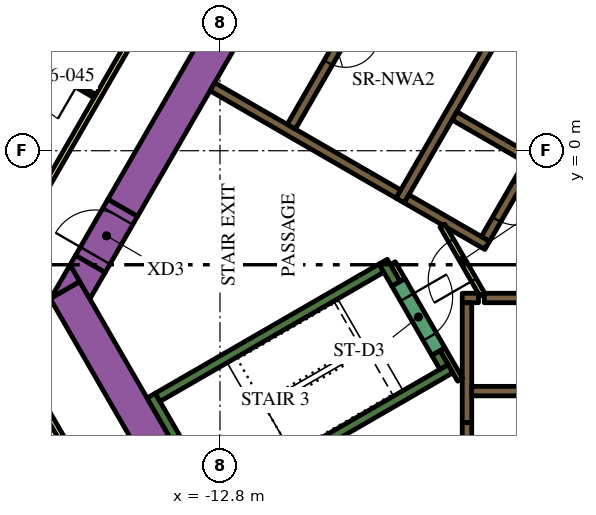
"""IFC4 building model, lengths in metres.
Left out: names, types, materials, properties, quantities, classifications, styles, units other than length and angle.
Written with IfcOpenShell. Run it as: python <this file> out.ifc"""

import sys

from ifc_helpers import new_model, si_unit, direction, frame, frame_2d, origin, place, context, subcontext, project, spatial, polyline, rectangle, outline, extrude, element, fill, save


model = new_model("IFC4")
c1 = context("Model", 3, precision=1e-05, world=origin(), true_north=direction((0.0, 1.0)))
c2 = subcontext(c1, "Body", "Model", "MODEL_VIEW")
j1 = project(units=[si_unit("LENGTHUNIT", "METRE"), si_unit("PLANEANGLEUNIT", "RADIAN")], contexts=[c1])
p1 = place(None, origin())
s1 = spatial("IfcSite", under=j1, at=p1, CompositionType="ELEMENT")
p2 = place(p1, origin())
s2 = spatial("IfcBuilding", under=s1, at=p2, CompositionType="ELEMENT")
p3 = place(p2, frame((0.0, 0.0, 87.6)))
s3 = spatial("IfcBuildingStorey", under=s2, at=p3, CompositionType="ELEMENT", Elevation=87.6)
p4 = place(p3, frame((-15.36, -1.503, 0.0), z_axis=(0.0, 0.0, 1.0), x_axis=(0.50000389221, 0.866023156604, 0.0)))
e1 = element("IfcWall", 1, at=p4, inside=s3, PredefinedType="SOLIDWALL", context=c2, shape_type="SweptSolid", body=[
    extrude(rectangle(XDim=21.0, YDim=0.9, at=frame_2d((10.5, 0.0))), origin(), (0.0, 0.0, 1.0), 3.9),
])
p5 = place(p3, frame((-12.134, -11.883, 0.0), z_axis=(0.0, 0.0, 1.0), x_axis=(-0.500005339912, 0.866022320763, 0.0)))
e2 = element("IfcWall", 2, at=p5, inside=s3, PredefinedType="SOLIDWALL", context=c2, shape_type="SweptSolid", body=[
    extrude(rectangle(XDim=9.488, YDim=0.9, at=frame_2d((4.744, 0.0))), origin(), (0.0, 0.0, 1.0), 3.9),
])
p6 = place(p3, origin())
e3 = element("IfcWall", 3, at=p6, inside=s3, PredefinedType="SOLIDWALL", context=c2, shape_type="SweptSolid", body=[
    extrude(outline(polyline([(-16.489, -3.44), (-17.251, -3.88), (-16.743, -3.0), (-16.489, -3.44)])), origin(), (0.0, 0.0, 1.0), 3.9),
])
e4 = element("IfcWall", 4, at=p6, inside=s3, PredefinedType="SOLIDWALL", context=c2, shape_type="SweptSolid", body=[
    extrude(outline(polyline([(-15.82, -3.201), (-16.223, -3.9), (-16.743, -3.0), (-16.599, -2.751), (-15.82, -3.201)])), origin(), (0.0, 0.0, 1.0), 3.9),
])
p7 = place(p3, frame((-12.885, -9.431, 0.0), z_axis=(0.0, 0.0, 1.0), x_axis=(-0.500020560727, 0.866013532718, 0.0)))
e5 = element("IfcWall", 5, at=p7, inside=s3, PredefinedType="SOLIDWALL", context=c2, shape_type="SweptSolid", body=[
    extrude(rectangle(XDim=3.45, YDim=0.25, at=frame_2d((1.725, 0.0))), origin(), (0.0, 0.0, 1.0), 3.9),
])
p8 = place(p3, frame((-14.44, -6.49, 0.0), z_axis=(0.0, 0.0, 1.0), x_axis=(0.866022966069, 0.500004222222, 0.0)))
e6 = element("IfcWall", 6, at=p8, inside=s3, PredefinedType="SOLIDWALL", context=c2, shape_type="SweptSolid", body=[
    extrude(rectangle(XDim=6.8, YDim=0.25, at=frame_2d((3.4, 0.0))), origin(), (0.0, 0.0, 1.0), 3.9),
])
p9 = place(p3, frame((-8.168, -3.503, 0.0), z_axis=(0.0, 0.0, 1.0), x_axis=(-0.499952099219, 0.866053057547, 0.0)))
e7 = element("IfcWall", 7, at=p9, inside=s3, PredefinedType="SOLIDWALL", context=c2, shape_type="SweptSolid", body=[
    extrude(rectangle(XDim=0.675, YDim=0.25, at=frame_2d((0.337, 0.0))), origin(), (0.0, 0.0, 1.0), 3.9),
])
p10 = place(p3, frame((-12.84, -9.261, 0.0), z_axis=(0.0, 0.0, 1.0), x_axis=(0.866016039709, 0.500016218704, 0.0)))
e8 = element("IfcWall", 8, at=p10, inside=s3, PredefinedType="SOLIDWALL", context=c2, shape_type="SweptSolid", body=[
    extrude(rectangle(XDim=7.05, YDim=0.25, at=frame_2d((3.525, 0.0))), origin(), (0.0, 0.0, 1.0), 3.9),
])
p11 = place(p3, frame((-6.905, -5.69, 0.0), z_axis=(0.0, 0.0, 1.0), x_axis=(-0.500402024738, 0.865793170242, 0.0)))
e9 = element("IfcWall", 9, at=p11, inside=s3, PredefinedType="SOLIDWALL", context=c2, shape_type="SweptSolid", body=[
    extrude(rectangle(XDim=0.425, YDim=0.25, at=frame_2d((0.212, 0.0))), origin(), (0.0, 0.0, 1.0), 3.9),
])
p12 = place(p3, frame((-5.845, -3.875, 0.0), z_axis=(0.0, 0.0, 1.0), x_axis=(1.0, 0.0, 0.0)))
e10 = element("IfcWall", 10, at=p12, inside=s3, PredefinedType="SOLIDWALL", context=c2, shape_type="SweptSolid", body=[
    extrude(rectangle(XDim=12.27, YDim=0.25, at=frame_2d((6.135, 0.0))), origin(), (0.0, 0.0, 1.0), 3.9),
])
p13 = place(p3, frame((-6.425, -3.875, 0.0), z_axis=(0.0, 0.0, 1.0), x_axis=(1.0, 0.0, 0.0)))
e11 = element("IfcWall", 11, at=p13, inside=s3, PredefinedType="SOLIDWALL", context=c2, shape_type="SweptSolid", body=[
    extrude(rectangle(XDim=0.428, YDim=0.25, at=frame_2d((0.214, 0.0))), origin(), (0.0, 0.0, 1.0), 3.9),
])
p14 = place(p3, frame((-6.3, -4.0, 0.0), z_axis=(0.0, 0.0, 1.0), x_axis=(0.0, -1.0, 0.0)))
e12 = element("IfcWall", 12, at=p14, inside=s3, PredefinedType="SOLIDWALL", context=c2, shape_type="SweptSolid", body=[
    extrude(rectangle(XDim=3.154, YDim=0.25, at=frame_2d((1.577, 0.0))), origin(), (0.0, 0.0, 1.0), 3.9),
])
p15 = place(p3, frame((-8.06, -1.311, 0.0), z_axis=(0.0, 0.0, 1.0), x_axis=(0.50000273126, 0.866023826885, 0.0)))
e13 = element("IfcWall", 13, at=p15, inside=s3, PredefinedType="SOLIDWALL", context=c2, shape_type="SweptSolid", body=[
    extrude(rectangle(XDim=10.33, YDim=0.25, at=frame_2d((5.165, 0.0))), origin(), (0.0, 0.0, 1.0), 3.9),
])
for number, where, z_axis, x_axis in (
    (14, (-5.369, 3.1, 0.0), (0.0, 0.0, 1.0), (0.866, -0.5, 0.0)),
    (15, (-4.724, -0.182, 0.0), (0.0, 0.0, 1.0), (-0.866, 0.5, 0.0)),
):
    element("IfcWall", number, at=place(p3, frame(where, z_axis=z_axis, x_axis=x_axis)), inside=s3, PredefinedType="SOLIDWALL", context=c2, shape_type="SweptSolid", body=[
        extrude(rectangle(XDim=2.2, YDim=0.25, at=frame_2d((1.1, 0.0))), origin(), (0.0, 0.0, 1.0), 3.9),
    ])
e16 = element("IfcWall", 16, at=p6, inside=s3, PredefinedType="SOLIDWALL", context=c2, shape_type="SweptSolid", body=[
    extrude(outline(polyline([(-5.922, -2.257), (-5.922, -2.257), (-5.705, -2.382), (-5.83, -2.598), (-6.829, -2.021), (-6.88, -1.934), (-6.88, -1.934), (-6.93, -1.963), (-7.952, -1.373), (-7.827, -1.156), (-5.922, -2.257)])), origin(), (0.0, 0.0, 1.0), 3.9),
])
p16 = place(p3, frame((-8.106, -1.14, 0.0), z_axis=(0.0, 0.0, 1.0), x_axis=(-0.866000643155, 0.500042884217, 0.0)))
e17 = element("IfcWall", 17, at=p16, inside=s3, PredefinedType="SOLIDWALL", context=c2, shape_type="SweptSolid", body=[
    extrude(rectangle(XDim=5.65, YDim=0.25, at=frame_2d((2.825, 0.0))), origin(), (0.0, 0.0, 1.0), 3.9),
])
p17 = place(p3, frame((-6.48, -6.027, 0.0), z_axis=(0.0, 0.0, 1.0), x_axis=(-0.499927229454, 0.866067413802, 0.0)))
e18 = element("IfcWall", 18, at=p17, inside=s3, PredefinedType="PARTITIONING", context=c2, shape_type="SweptSolid", body=[
    extrude(rectangle(XDim=0.929, YDim=0.15, at=frame_2d((0.464, 0.0))), origin(), (0.0, 0.0, 1.0), 3.9),
])
p18 = place(p3, frame((-8.252, -2.958, 0.0), z_axis=(0.0, 0.0, 1.0), x_axis=(0.500174715838, -0.865924508047, 0.0)))
e19 = element("IfcWall", 19, at=p18, inside=s3, PredefinedType="PARTITIONING", context=c2, shape_type="SweptSolid", body=[
    extrude(rectangle(XDim=0.514, YDim=0.15, at=frame_2d((0.257, 0.0))), origin(), (0.0, 0.0, 1.0), 2.75),
])
p19 = place(p3, frame((-6.175, -6.325, 0.0), z_axis=(0.0, 0.0, 1.0), x_axis=(1.0, 0.0, 0.0)))
e20 = element("IfcWall", 20, at=p19, inside=s3, PredefinedType="SOLIDWALL", context=c2, shape_type="SweptSolid", body=[
    extrude(rectangle(XDim=12.35, YDim=0.25, at=frame_2d((6.175, 0.0))), origin(), (0.0, 0.0, 1.0), 3.9),
])
p20 = place(p19, frame((3.205, 0.0, 0.0)))
e21 = element("IfcOpeningElement", 21, at=p20, cuts=e20, PredefinedType="OPENING", context=c2, shape_type="SweptSolid", body=[
    extrude(rectangle(XDim=0.9, YDim=2.1, at=frame_2d((0.45, 1.05))), frame((0.0, 0.135, 0.0), z_axis=(0.0, -1.0, 0.0), x_axis=(1.0, 0.0, 0.0)), (0.0, 0.0, 1.0), 0.27),
])
p21 = place(p19, frame((8.145, 0.0, 0.0)))
e22 = element("IfcOpeningElement", 22, at=p21, cuts=e20, PredefinedType="OPENING", context=c2, shape_type="SweptSolid", body=[
    extrude(rectangle(XDim=1.1, YDim=2.1, at=frame_2d((0.55, 1.05))), frame((0.0, 0.135, 0.0), z_axis=(0.0, -1.0, 0.0), x_axis=(1.0, 0.0, 0.0)), (0.0, 0.0, 1.0), 0.27),
])
p22 = place(p19, frame((10.665, 0.0, 0.0)))
e23 = element("IfcOpeningElement", 23, at=p22, cuts=e20, PredefinedType="OPENING", context=c2, shape_type="SweptSolid", body=[
    extrude(rectangle(XDim=1.1, YDim=2.1, at=frame_2d((0.55, 1.05))), frame((0.0, 0.135, 0.0), z_axis=(0.0, -1.0, 0.0), x_axis=(1.0, 0.0, 0.0)), (0.0, 0.0, 1.0), 0.27),
])
p23 = place(p3, frame((-6.008, 9.144, 0.0), z_axis=(0.0, 0.0, 1.0), x_axis=(-0.500006956611, -0.866021387346, 0.0)))
e24 = element("IfcWall", 24, at=p23, inside=s3, PredefinedType="SOLIDWALL", context=c2, shape_type="SweptSolid", body=[
    extrude(rectangle(XDim=9.83, YDim=0.25, at=frame_2d((4.915, 0.0))), origin(), (0.0, 0.0, 1.0), 3.9),
])
p24 = place(p23, frame((6.985, 0.0, 0.0)))
e25 = element("IfcOpeningElement", 25, at=p24, cuts=e24, PredefinedType="OPENING", context=c2, shape_type="SweptSolid", body=[
    extrude(rectangle(XDim=0.9, YDim=2.1, at=frame_2d((0.45, 1.05))), frame((0.0, 0.135, 0.0), z_axis=(0.0, -1.0, 0.0), x_axis=(1.0, 0.0, 0.0)), (0.0, 0.0, 1.0), 0.27),
])
p25 = place(p3, frame((-0.898, 6.194, 0.0), z_axis=(0.0, 0.0, 1.0), x_axis=(-0.499996202215, -0.866027596426, 0.0)))
e26 = element("IfcWall", 26, at=p25, inside=s3, PredefinedType="SOLIDWALL", context=c2, shape_type="SweptSolid", body=[
    extrude(rectangle(XDim=9.83, YDim=0.25, at=frame_2d((4.915, 0.0))), origin(), (0.0, 0.0, 1.0), 3.9),
])
p26 = place(p25, frame((0.585, 0.0, 0.0)))
e27 = element("IfcOpeningElement", 27, at=p26, cuts=e26, PredefinedType="OPENING", context=c2, shape_type="SweptSolid", body=[
    extrude(rectangle(XDim=1.1, YDim=2.1, at=frame_2d((0.55, 1.05))), frame((0.0, 0.135, 0.0), z_axis=(0.0, -1.0, 0.0), x_axis=(1.0, 0.0, 0.0)), (0.0, 0.0, 1.0), 0.27),
])
p27 = place(p25, frame((3.105, 0.0, 0.0)))
e28 = element("IfcOpeningElement", 28, at=p27, cuts=e26, PredefinedType="OPENING", context=c2, shape_type="SweptSolid", body=[
    extrude(rectangle(XDim=1.1, YDim=2.1, at=frame_2d((0.55, 1.05))), frame((0.0, 0.135, 0.0), z_axis=(0.0, -1.0, 0.0), x_axis=(1.0, 0.0, 0.0)), (0.0, 0.0, 1.0), 0.27),
])
p28 = place(p25, frame((5.625, 0.0, 0.0)))
e29 = element("IfcOpeningElement", 29, at=p28, cuts=e26, PredefinedType="OPENING", context=c2, shape_type="SweptSolid", body=[
    extrude(rectangle(XDim=1.1, YDim=2.1, at=frame_2d((0.55, 1.05))), frame((0.0, 0.135, 0.0), z_axis=(0.0, -1.0, 0.0), x_axis=(1.0, 0.0, 0.0)), (0.0, 0.0, 1.0), 0.27),
])
p29 = place(p25, frame((8.145, 0.0, 0.0)))
e30 = element("IfcOpeningElement", 30, at=p29, cuts=e26, PredefinedType="OPENING", context=c2, shape_type="SweptSolid", body=[
    extrude(rectangle(XDim=1.1, YDim=2.1, at=frame_2d((0.55, 1.05))), frame((0.0, 0.135, 0.0), z_axis=(0.0, -1.0, 0.0), x_axis=(1.0, 0.0, 0.0)), (0.0, 0.0, 1.0), 0.27),
])
p30 = place(p3, frame((-8.103, -3.466, 0.0), z_axis=(0.0, 0.0, 1.0), x_axis=(0.500078061341, -0.865980330357, 0.0)))
e31 = element("IfcWall", 31, at=p30, inside=s3, PredefinedType="SOLIDWALL", context=c2, shape_type="SweptSolid", body=[
    extrude(rectangle(XDim=2.1, YDim=0.4, at=frame_2d((1.05, 0.0))), origin(), (0.0, 0.0, 1.0), 3.9),
])
p31 = place(p30, frame((0.45, 0.0, 0.0)))
e32 = element("IfcOpeningElement", 32, at=p31, cuts=e31, PredefinedType="OPENING", context=c2, shape_type="SweptSolid", body=[
    extrude(rectangle(XDim=1.2, YDim=2.1, at=frame_2d((0.6, 1.05))), frame((0.0, 0.21, 0.0), z_axis=(0.0, -1.0, 0.0), x_axis=(1.0, 0.0, 0.0)), (0.0, 0.0, 1.0), 0.42),
])
p32 = place(p3, frame((-6.3, -7.154, 0.0), z_axis=(0.0, 0.0, 1.0), x_axis=(0.0, -1.0, 0.0)))
e33 = element("IfcWall", 33, at=p32, inside=s3, PredefinedType="SOLIDWALL", context=c2, shape_type="SweptSolid", body=[
    extrude(rectangle(XDim=1.8, YDim=0.25, at=frame_2d((0.9, 0.0))), origin(), (0.0, 0.0, 1.0), 3.9),
])
p33 = place(p32, frame((0.45, 0.0, 0.0)))
e34 = element("IfcOpeningElement", 34, at=p33, cuts=e33, PredefinedType="OPENING", context=c2, shape_type="SweptSolid", body=[
    extrude(rectangle(XDim=0.9, YDim=2.1, at=frame_2d((0.45, 1.05))), frame((0.0, 0.135, 0.0), z_axis=(0.0, -1.0, 0.0), x_axis=(1.0, 0.0, 0.0)), (0.0, 0.0, 1.0), 0.27),
])
p34 = place(p3, frame((-5.895, -3.79, 0.0), z_axis=(0.0, 0.0, 1.0), x_axis=(-0.49994051562, 0.866059744384, 0.0)))
e35 = element("IfcWall", 35, at=p34, inside=s3, PredefinedType="PARTITIONING", context=c2, shape_type="SweptSolid", body=[
    extrude(rectangle(XDim=2.1, YDim=0.15, at=frame_2d((1.05, 0.0))), origin(), (0.0, 0.0, 1.0), 2.75),
])
p35 = place(p34, frame((0.45, 0.0, 0.0)))
e36 = element("IfcOpeningElement", 36, at=p35, cuts=e35, PredefinedType="OPENING", context=c2, shape_type="SweptSolid", body=[
    extrude(rectangle(XDim=1.2, YDim=2.1, at=frame_2d((0.6, 1.05))), frame((0.0, 0.085, 0.0), z_axis=(0.0, -1.0, 0.0), x_axis=(1.0, 0.0, 0.0)), (0.0, 0.0, 1.0), 0.17),
])
p36 = place(p3, frame((-16.209, -2.976, 0.0), z_axis=(0.0, 0.0, 1.0), x_axis=(0.499954529098, 0.86605165483, 0.0)))
e37 = element("IfcWall", 37, at=p36, inside=s3, PredefinedType="SOLIDWALL", context=c2, shape_type="SweptSolid", body=[
    extrude(rectangle(XDim=1.7, YDim=0.9, at=frame_2d((0.85, 0.0))), origin(), (0.0, 0.0, 1.0), 3.9),
])
p37 = place(p36, frame((0.25, 0.0, 0.0)))
e38 = element("IfcOpeningElement", 38, at=p37, cuts=e37, PredefinedType="OPENING", context=c2, shape_type="SweptSolid", body=[
    extrude(rectangle(XDim=1.2, YDim=2.1, at=frame_2d((0.6, 1.05))), frame((0.0, 0.46, 0.0), z_axis=(0.0, -1.0, 0.0), x_axis=(1.0, 0.0, 0.0)), (0.0, 0.0, 1.0), 0.92),
])
p38 = place(p3, frame((-19.081, -3.9, 0.0), z_axis=(0.0, 0.0, 1.0), x_axis=(0.499998313975, 0.866026377209, 0.0)))
e39 = element("IfcWall", 39, at=p38, inside=s3, PredefinedType="PARTITIONING", context=c2, shape_type="SweptSolid", body=[
    extrude(rectangle(XDim=25.766, YDim=0.15, at=frame_2d((12.883, 0.0))), origin(), (0.0, 0.0, 1.0), 2.75),
])
p39 = place(p38, frame((19.306, 0.0, 0.0)))
e40 = element("IfcOpeningElement", 40, at=p39, cuts=e39, PredefinedType="OPENING", context=c2, shape_type="SweptSolid", body=[
    extrude(rectangle(XDim=1.0, YDim=2.1, at=frame_2d((0.5, 1.05))), frame((0.0, 0.085, 0.0), z_axis=(0.0, -1.0, 0.0), x_axis=(1.0, 0.0, 0.0)), (0.0, 0.0, 1.0), 0.17),
])
p40 = place(p38, frame((18.0, 0.0, 0.0)))
e41 = element("IfcOpeningElement", 41, at=p40, cuts=e39, PredefinedType="OPENING", context=c2, shape_type="SweptSolid", body=[
    extrude(rectangle(XDim=1.0, YDim=2.1, at=frame_2d((0.5, 1.05))), frame((0.0, 0.085, 0.0), z_axis=(0.0, -1.0, 0.0), x_axis=(1.0, 0.0, 0.0)), (0.0, 0.0, 1.0), 0.17),
])
p41 = place(p38, frame((10.874, 0.0, 0.0)))
e42 = element("IfcOpeningElement", 42, at=p41, cuts=e39, PredefinedType="OPENING", context=c2, shape_type="SweptSolid", body=[
    extrude(rectangle(XDim=0.9, YDim=2.1, at=frame_2d((0.45, 1.05))), frame((0.0, 0.085, 0.0), z_axis=(0.0, -1.0, 0.0), x_axis=(1.0, 0.0, 0.0)), (0.0, 0.0, 1.0), 0.17),
])
p42 = place(p38, frame((8.548, 0.0, 0.0)))
e43 = element("IfcOpeningElement", 43, at=p42, cuts=e39, PredefinedType="OPENING", context=c2, shape_type="SweptSolid", body=[
    extrude(rectangle(XDim=1.1, YDim=2.1, at=frame_2d((0.55, 1.05))), frame((0.0, 0.085, 0.0), z_axis=(0.0, -1.0, 0.0), x_axis=(1.0, 0.0, 0.0)), (0.0, 0.0, 1.0), 0.17),
])
p43 = place(p38, frame((0.18, 0.0, 0.0)))
e44 = element("IfcOpeningElement", 44, at=p43, cuts=e39, PredefinedType="OPENING", context=c2, shape_type="SweptSolid", body=[
    extrude(rectangle(XDim=1.0, YDim=2.1, at=frame_2d((0.5, 1.05))), frame((0.0, 0.085, 0.0), z_axis=(0.0, -1.0, 0.0), x_axis=(1.0, 0.0, 0.0)), (0.0, 0.0, 1.0), 0.17),
])
p44 = place(p3, frame((-16.412, -8.523, 0.0), z_axis=(0.0, 0.0, 1.0), x_axis=(-0.500001929737, 0.866024289647, 0.0)))
e45 = element("IfcWall", 45, at=p44, inside=s3, PredefinedType="PARTITIONING", context=c2, shape_type="SweptSolid", body=[
    extrude(rectangle(XDim=5.268, YDim=0.15, at=frame_2d((2.634, 0.0))), origin(), (0.0, 0.0, 1.0), 2.75),
])
p45 = place(p3, frame((-26.591, -3.122, 0.0), z_axis=(0.0, 0.0, 1.0), x_axis=(0.893766213273, -0.448533115847, 0.0)))
e46 = element("IfcWall", 46, at=p45, inside=s3, PredefinedType="PARTITIONING", context=c2, shape_type="SweptSolid", body=[
    extrude(rectangle(XDim=10.875, YDim=0.15, at=frame_2d((5.438, 0.0))), origin(), (0.0, 0.0, 1.0), 2.75),
])
p46 = place(p3, frame((-16.087, 1.436, 0.0), z_axis=(0.0, 0.0, 1.0), x_axis=(-0.866034573852, 0.49998411664, 0.0)))
e47 = element("IfcWall", 47, at=p46, inside=s3, PredefinedType="PARTITIONING", context=c2, shape_type="SweptSolid", body=[
    extrude(rectangle(XDim=2.8, YDim=0.1, at=frame_2d((1.4, 0.0))), origin(), (0.0, 0.0, 1.0), 2.75),
])
p47 = place(p46, frame((0.55, 0.0, 0.0)))
e48 = element("IfcOpeningElement", 48, at=p47, cuts=e47, PredefinedType="OPENING", context=c2, shape_type="SweptSolid", body=[
    extrude(rectangle(XDim=1.0, YDim=2.1, at=frame_2d((0.5, 1.05))), frame((0.0, 0.06, 0.0), z_axis=(0.0, -1.0, 0.0), x_axis=(1.0, 0.0, 0.0)), (0.0, 0.0, 1.0), 0.12),
])
p48 = place(p24, origin())
e49 = element("IfcDoor", 49, at=p48, inside=s3, OperationType="SINGLE_SWING_LEFT", PredefinedType="DOOR", context=c2, shape_type="SweptSolid", body=[
    extrude(rectangle(XDim=0.9, YDim=2.1, at=frame_2d((0.45, 1.05))), frame((0.0, 0.025, 0.0), z_axis=(0.0, -1.0, 0.0), x_axis=(1.0, 0.0, 0.0)), (0.0, 0.0, 1.0), 0.05),
])
fill(e25, e49)
p49 = place(p29, origin())
e50 = element("IfcDoor", 50, at=p49, inside=s3, OperationType="DOUBLE_DOOR_SLIDING", PredefinedType="DOOR", context=c2, shape_type="SweptSolid", body=[
    extrude(rectangle(XDim=1.1, YDim=2.1, at=frame_2d((0.55, 1.05))), frame((0.0, 0.025, 0.0), z_axis=(0.0, -1.0, 0.0), x_axis=(1.0, 0.0, 0.0)), (0.0, 0.0, 1.0), 0.05),
])
fill(e30, e50)
p50 = place(p31, origin())
e51 = element("IfcDoor", 51, at=p50, inside=s3, OperationType="SINGLE_SWING_LEFT", PredefinedType="DOOR", context=c2, shape_type="SweptSolid", body=[
    extrude(rectangle(XDim=1.2, YDim=2.1, at=frame_2d((0.6, 1.05))), frame((0.0, 0.025, 0.0), z_axis=(0.0, -1.0, 0.0), x_axis=(1.0, 0.0, 0.0)), (0.0, 0.0, 1.0), 0.05),
])
fill(e32, e51)
p51 = place(p35, origin())
e52 = element("IfcDoor", 52, at=p51, inside=s3, OperationType="SINGLE_SWING_LEFT", PredefinedType="DOOR", context=c2, shape_type="SweptSolid", body=[
    extrude(rectangle(XDim=1.2, YDim=2.1, at=frame_2d((0.6, 1.05))), frame((0.0, 0.025, 0.0), z_axis=(0.0, -1.0, 0.0), x_axis=(1.0, 0.0, 0.0)), (0.0, 0.0, 1.0), 0.05),
])
fill(e36, e52)
p52 = place(p37, origin())
e53 = element("IfcDoor", 53, at=p52, inside=s3, OperationType="SINGLE_SWING_LEFT", PredefinedType="DOOR", context=c2, shape_type="SweptSolid", body=[
    extrude(rectangle(XDim=1.2, YDim=2.1, at=frame_2d((0.6, 1.05))), frame((0.0, 0.025, 0.0), z_axis=(0.0, -1.0, 0.0), x_axis=(1.0, 0.0, 0.0)), (0.0, 0.0, 1.0), 0.05),
])
fill(e38, e53)
p53 = place(p47, origin())
e54 = element("IfcDoor", 54, at=p53, inside=s3, OperationType="SINGLE_SWING_RIGHT", PredefinedType="DOOR", context=c2, shape_type="SweptSolid", body=[
    extrude(rectangle(XDim=1.0, YDim=2.1, at=frame_2d((0.5, 1.05))), frame((0.0, 0.025, 0.0), z_axis=(0.0, -1.0, 0.0), x_axis=(1.0, 0.0, 0.0)), (0.0, 0.0, 1.0), 0.05),
])
fill(e48, e54)
save(model, sys.argv[1])
